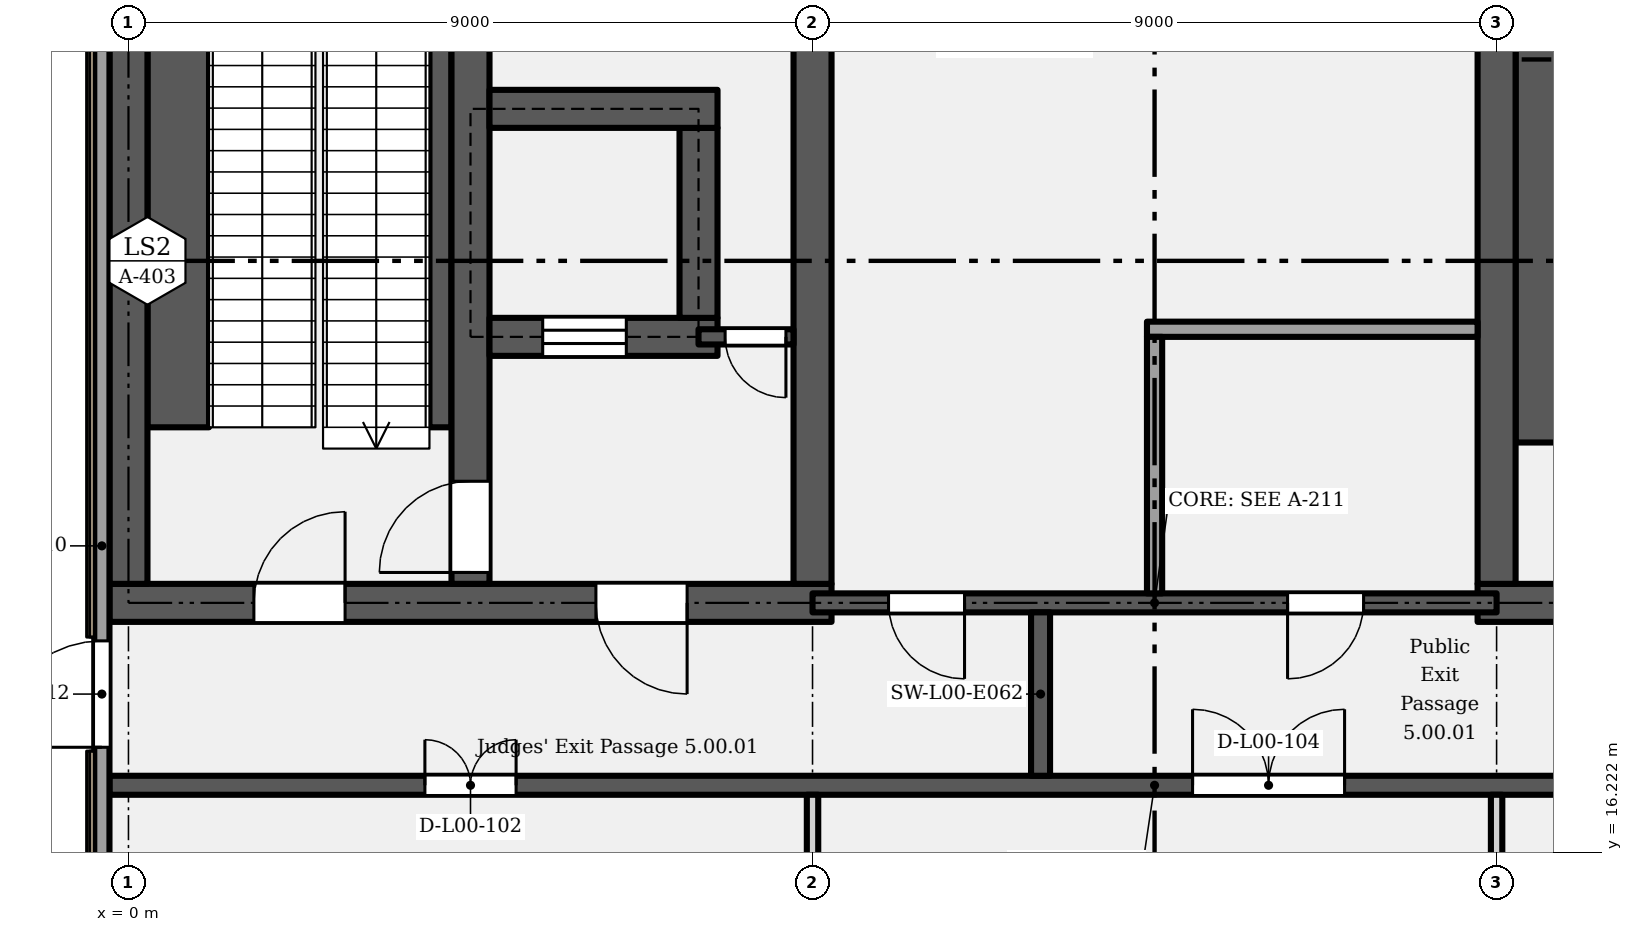
"""IFC4 building model, lengths in metres.
Left out: names, types, materials, properties, quantities, classifications, styles, units other than length and angle.
Written with IfcOpenShell. Run it as: python <this file> out.ifc"""

import sys

from ifc_helpers import new_model, si_unit, direction, frame, frame_2d, origin, place, context, subcontext, project, spatial, rectangle, extrude, element, fill, save


model = new_model("IFC4")
c1 = context("Model", 3, precision=1e-05, world=origin(), true_north=direction((0.0, 1.0)))
c2 = subcontext(c1, "Body", "Model", "MODEL_VIEW")
j1 = project(units=[si_unit("LENGTHUNIT", "METRE"), si_unit("PLANEANGLEUNIT", "RADIAN")], contexts=[c1])
p1 = place(None, origin())
s1 = spatial("IfcSite", under=j1, at=p1, CompositionType="ELEMENT")
p2 = place(p1, origin())
s2 = spatial("IfcBuilding", under=s1, at=p2, CompositionType="ELEMENT")
p3 = place(p2, origin())
s3 = spatial("IfcBuildingStorey", under=s2, at=p3, CompositionType="ELEMENT", Elevation=0.0)
p4 = place(p3, frame((-0.25, 19.5, 0.0), z_axis=(0.0, 0.0, 1.0), x_axis=(1.0, 0.0, 0.0)))
e1 = element("IfcWall", 1, at=p4, inside=s3, PredefinedType="SHEAR", context=c2, shape_type="SweptSolid", body=[
    extrude(rectangle(XDim=9.5, YDim=0.5, at=frame_2d((4.75, 0.0))), origin(), (0.0, 0.0, 1.0), 6.3),
])
p5 = place(p4, frame((1.9, 0.0, 0.0)))
e2 = element("IfcOpeningElement", 2, at=p5, cuts=e1, PredefinedType="OPENING", context=c2, shape_type="SweptSolid", body=[
    extrude(rectangle(XDim=1.2, YDim=2.1, at=frame_2d((0.6, 1.05))), frame((0.0, 0.26, 0.0), z_axis=(0.0, -1.0, 0.0), x_axis=(1.0, 0.0, 0.0)), (0.0, 0.0, 1.0), 0.52),
])
p6 = place(p4, frame((7.6, 0.0, 0.0), z_axis=(0.0, 0.0, 1.0), x_axis=(-1.0, 0.0, 0.0)))
e3 = element("IfcOpeningElement", 3, at=p6, cuts=e1, PredefinedType="OPENING", context=c2, shape_type="SweptSolid", body=[
    extrude(rectangle(XDim=1.2, YDim=2.1, at=frame_2d((0.6, 1.05))), frame((0.0, 0.26, 0.0), z_axis=(0.0, -1.0, 0.0), x_axis=(1.0, 0.0, 0.0)), (0.0, 0.0, 1.0), 0.52),
])
p7 = place(p3, frame((17.75, 19.5, 0.0), z_axis=(0.0, 0.0, 1.0), x_axis=(1.0, 0.0, 0.0)))
e4 = element("IfcWall", 4, at=p7, inside=s3, PredefinedType="SHEAR", context=c2, shape_type="SweptSolid", body=[
    extrude(rectangle(XDim=9.5, YDim=0.5, at=frame_2d((4.75, 0.0))), origin(), (0.0, 0.0, 1.0), 6.3),
])
p8 = place(p7, frame((1.9, 0.0, 0.0)))
e5 = element("IfcOpeningElement", 5, at=p8, cuts=e4, PredefinedType="OPENING", context=c2, shape_type="SweptSolid", body=[
    extrude(rectangle(XDim=1.2, YDim=2.1, at=frame_2d((0.6, 1.05))), frame((0.0, 0.26, 0.0), z_axis=(0.0, -1.0, 0.0), x_axis=(1.0, 0.0, 0.0)), (0.0, 0.0, 1.0), 0.52),
])
p9 = place(p7, frame((7.95, 0.0, 0.0), z_axis=(0.0, 0.0, 1.0), x_axis=(-1.0, 0.0, 0.0)))
e6 = element("IfcOpeningElement", 6, at=p9, cuts=e4, PredefinedType="OPENING", context=c2, shape_type="SweptSolid", body=[
    extrude(rectangle(XDim=1.8, YDim=2.1, at=frame_2d((0.9, 1.05))), frame((0.0, 0.26, 0.0), z_axis=(0.0, -1.0, 0.0), x_axis=(1.0, 0.0, 0.0)), (0.0, 0.0, 1.0), 0.52),
])
p10 = place(p3, frame((0.0, 19.75, 0.0), z_axis=(0.0, 0.0, 1.0), x_axis=(0.0, 1.0, 0.0)))
e7 = element("IfcWall", 7, at=p10, inside=s3, PredefinedType="SHEAR", context=c2, shape_type="SweptSolid", body=[
    extrude(rectangle(XDim=8.3, YDim=0.5, at=frame_2d((4.15, 0.0))), origin(), (0.0, 0.0, 1.0), 6.3),
])
p11 = place(p3, frame((4.5, 19.75, 0.0), z_axis=(0.0, 0.0, 1.0), x_axis=(0.0, 1.0, 0.0)))
e8 = element("IfcWall", 8, at=p11, inside=s3, PredefinedType="SHEAR", context=c2, shape_type="SweptSolid", body=[
    extrude(rectangle(XDim=8.5, YDim=0.5, at=frame_2d((4.25, 0.0))), origin(), (0.0, 0.0, 1.0), 6.3),
])
p12 = place(p11, frame((0.15, 0.0, 0.0)))
e9 = element("IfcOpeningElement", 9, at=p12, cuts=e8, PredefinedType="OPENING", context=c2, shape_type="SweptSolid", body=[
    extrude(rectangle(XDim=1.2, YDim=2.1, at=frame_2d((0.6, 1.05))), frame((0.0, 0.26, 0.0), z_axis=(0.0, -1.0, 0.0), x_axis=(1.0, 0.0, 0.0)), (0.0, 0.0, 1.0), 0.52),
])
for number, where, z_axis, x_axis in (
    (10, (9.0, 19.75, 0.0), (0.0, 0.0, 1.0), (0.0, 1.0, 0.0)),
    (11, (18.0, 19.75, 0.0), (0.0, 0.0, 1.0), (0.0, 1.0, 0.0)),
):
    element("IfcWall", number, at=place(p3, frame(where, z_axis=z_axis, x_axis=x_axis)), inside=s3, PredefinedType="SHEAR", context=c2, shape_type="SweptSolid", body=[
        extrude(rectangle(XDim=8.05, YDim=0.5, at=frame_2d((4.025, 0.0))), origin(), (0.0, 0.0, 1.0), 6.3),
    ])
p13 = place(p3, frame((4.75, 23.0, 0.0), z_axis=(0.0, 0.0, 1.0), x_axis=(1.0, 0.0, 0.0)))
e12 = element("IfcWall", 12, at=p13, inside=s3, PredefinedType="SHEAR", context=c2, shape_type="SweptSolid", body=[
    extrude(rectangle(XDim=3.0, YDim=0.5, at=frame_2d((1.5, 0.0))), origin(), (0.0, 0.0, 1.0), 6.3),
])
p14 = place(p13, frame((0.7, 0.0, 0.0)))
e13 = element("IfcOpeningElement", 13, at=p14, cuts=e12, PredefinedType="OPENING", context=c2, shape_type="SweptSolid", body=[
    extrude(rectangle(XDim=1.1, YDim=2.1, at=frame_2d((0.55, 1.05))), frame((0.0, 0.26, 0.0), z_axis=(0.0, -1.0, 0.0), x_axis=(1.0, 0.0, 0.0)), (0.0, 0.0, 1.0), 0.52),
])
p15 = place(p3, frame((7.5, 23.25, 0.0), z_axis=(0.0, 0.0, 1.0), x_axis=(0.0, 1.0, 0.0)))
e14 = element("IfcWall", 14, at=p15, inside=s3, PredefinedType="SHEAR", context=c2, shape_type="SweptSolid", body=[
    extrude(rectangle(XDim=2.5, YDim=0.5, at=frame_2d((1.25, 0.0))), origin(), (0.0, 0.0, 1.0), 6.3),
])
p16 = place(p3, frame((4.75, 26.0, 0.0), z_axis=(0.0, 0.0, 1.0), x_axis=(1.0, 0.0, 0.0)))
e15 = element("IfcWall", 15, at=p16, inside=s3, PredefinedType="SHEAR", context=c2, shape_type="SweptSolid", body=[
    extrude(rectangle(XDim=3.0, YDim=0.5, at=frame_2d((1.5, 0.0))), origin(), (0.0, 0.0, 1.0), 6.3),
])
p17 = place(p3, frame((-0.35, 12.45, 0.0), z_axis=(0.0, 0.0, 1.0), x_axis=(0.0, 1.0, 0.0)))
e16 = element("IfcWall", 16, at=p17, inside=s3, PredefinedType="SOLIDWALL", context=c2, shape_type="SweptSolid", body=[
    extrude(rectangle(XDim=15.6, YDim=0.2, at=frame_2d((7.8, 0.0))), origin(), (0.0, 0.0, 1.0), 6.3),
])
p18 = place(p17, frame((1.2, 0.0, 0.0)))
e17 = element("IfcOpeningElement", 17, at=p18, cuts=e16, PredefinedType="OPENING", context=c2, shape_type="SweptSolid", body=[
    extrude(rectangle(XDim=1.8, YDim=2.1, at=frame_2d((0.9, 1.05))), frame((0.0, 0.11, 0.0), z_axis=(0.0, -1.0, 0.0), x_axis=(1.0, 0.0, 0.0)), (0.0, 0.0, 1.0), 0.22),
])
p19 = place(p17, frame((5.15, 0.0, 0.0)))
e18 = element("IfcOpeningElement", 18, at=p19, cuts=e16, PredefinedType="OPENING", context=c2, shape_type="SweptSolid", body=[
    extrude(rectangle(XDim=1.4, YDim=2.1, at=frame_2d((0.7, 1.05))), frame((0.0, 0.11, 0.0), z_axis=(0.0, -1.0, 0.0), x_axis=(1.0, 0.0, 0.0)), (0.0, 0.0, 1.0), 0.22),
])
p20 = place(p3, frame((-0.25, 17.1, 0.0), z_axis=(0.0, 0.0, 1.0), x_axis=(1.0, 0.0, 0.0)))
e19 = element("IfcWall", 19, at=p20, inside=s3, PredefinedType="SHEAR", context=c2, shape_type="SweptSolid", body=[
    extrude(rectangle(XDim=27.5, YDim=0.25, at=frame_2d((13.75, 0.0))), origin(), (0.0, 0.0, 1.0), 6.3),
])
p21 = place(p20, frame((4.15, 0.0, 0.0)))
e20 = element("IfcOpeningElement", 20, at=p21, cuts=e19, PredefinedType="OPENING", context=c2, shape_type="SweptSolid", body=[
    extrude(rectangle(XDim=1.2, YDim=2.1, at=frame_2d((0.6, 1.05))), frame((0.0, 0.135, 0.0), z_axis=(0.0, -1.0, 0.0), x_axis=(1.0, 0.0, 0.0)), (0.0, 0.0, 1.0), 0.27),
])
p22 = place(p20, frame((14.25, 0.0, 0.0)))
e21 = element("IfcOpeningElement", 21, at=p22, cuts=e19, PredefinedType="OPENING", context=c2, shape_type="SweptSolid", body=[
    extrude(rectangle(XDim=2.0, YDim=2.1, at=frame_2d((1.0, 1.05))), frame((0.0, 0.135, 0.0), z_axis=(0.0, -1.0, 0.0), x_axis=(1.0, 0.0, 0.0)), (0.0, 0.0, 1.0), 0.27),
])
p23 = place(p20, frame((20.0, 0.0, 0.0)))
e22 = element("IfcOpeningElement", 22, at=p23, cuts=e19, PredefinedType="OPENING", context=c2, shape_type="SweptSolid", body=[
    extrude(rectangle(XDim=1.0, YDim=2.1, at=frame_2d((0.5, 1.05))), frame((0.0, 0.135, 0.0), z_axis=(0.0, -1.0, 0.0), x_axis=(1.0, 0.0, 0.0)), (0.0, 0.0, 1.0), 0.27),
])
p24 = place(p20, frame((23.45, 0.0, 0.0)))
e23 = element("IfcOpeningElement", 23, at=p24, cuts=e19, PredefinedType="OPENING", context=c2, shape_type="SweptSolid", body=[
    extrude(rectangle(XDim=0.9, YDim=2.1, at=frame_2d((0.45, 1.05))), frame((0.0, 0.135, 0.0), z_axis=(0.0, -1.0, 0.0), x_axis=(1.0, 0.0, 0.0)), (0.0, 0.0, 1.0), 0.27),
])
p25 = place(p20, frame((25.45, 0.0, 0.0)))
e24 = element("IfcOpeningElement", 24, at=p25, cuts=e19, PredefinedType="OPENING", context=c2, shape_type="SweptSolid", body=[
    extrude(rectangle(XDim=0.9, YDim=2.1, at=frame_2d((0.45, 1.05))), frame((0.0, 0.135, 0.0), z_axis=(0.0, -1.0, 0.0), x_axis=(1.0, 0.0, 0.0)), (0.0, 0.0, 1.0), 0.27),
])
p26 = place(p3, frame((9.0, 19.5, 0.0), z_axis=(0.0, 0.0, 1.0), x_axis=(1.0, 0.0, 0.0)))
e25 = element("IfcWall", 25, at=p26, inside=s3, PredefinedType="SHEAR", context=c2, shape_type="SweptSolid", body=[
    extrude(rectangle(XDim=9.0, YDim=0.25, at=frame_2d((4.5, 0.0))), origin(), (0.0, 0.0, 1.0), 6.3),
])
p27 = place(p26, frame((2.0, 0.0, 0.0), z_axis=(0.0, 0.0, 1.0), x_axis=(-1.0, 0.0, 0.0)))
e26 = element("IfcOpeningElement", 26, at=p27, cuts=e25, PredefinedType="OPENING", context=c2, shape_type="SweptSolid", body=[
    extrude(rectangle(XDim=1.0, YDim=2.1, at=frame_2d((0.5, 1.05))), frame((0.0, 0.135, 0.0), z_axis=(0.0, -1.0, 0.0), x_axis=(1.0, 0.0, 0.0)), (0.0, 0.0, 1.0), 0.27),
])
p28 = place(p26, frame((7.25, 0.0, 0.0), z_axis=(0.0, 0.0, 1.0), x_axis=(-1.0, 0.0, 0.0)))
e27 = element("IfcOpeningElement", 27, at=p28, cuts=e25, PredefinedType="OPENING", context=c2, shape_type="SweptSolid", body=[
    extrude(rectangle(XDim=1.0, YDim=2.1, at=frame_2d((0.5, 1.05))), frame((0.0, 0.135, 0.0), z_axis=(0.0, -1.0, 0.0), x_axis=(1.0, 0.0, 0.0)), (0.0, 0.0, 1.0), 0.27),
])
p29 = place(p3, frame((7.5, 23.0, 0.0), z_axis=(0.0, 0.0, 1.0), x_axis=(1.0, 0.0, 0.0)))
e28 = element("IfcWall", 28, at=p29, inside=s3, PredefinedType="SHEAR", context=c2, shape_type="SweptSolid", body=[
    extrude(rectangle(XDim=1.25, YDim=0.2, at=frame_2d((0.625, 0.0))), origin(), (0.0, 0.0, 1.0), 6.3),
])
p30 = place(p29, frame((1.15, 0.0, 0.0), z_axis=(0.0, 0.0, 1.0), x_axis=(-1.0, 0.0, 0.0)))
e29 = element("IfcOpeningElement", 29, at=p30, cuts=e28, PredefinedType="OPENING", context=c2, shape_type="SweptSolid", body=[
    extrude(rectangle(XDim=0.8, YDim=2.0, at=frame_2d((0.4, 1.0))), frame((0.0, 0.11, 0.0), z_axis=(0.0, -1.0, 0.0), x_axis=(1.0, 0.0, 0.0)), (0.0, 0.0, 1.0), 0.22),
])
p31 = place(p3, frame((13.4, 23.1, 0.0), z_axis=(0.0, 0.0, 1.0), x_axis=(1.0, 0.0, 0.0)))
e30 = element("IfcWall", 30, at=p31, inside=s3, PredefinedType="PARTITIONING", context=c2, shape_type="SweptSolid", body=[
    extrude(rectangle(XDim=4.35, YDim=0.2, at=frame_2d((2.175, 0.0))), origin(), (0.0, 0.0, 1.0), 6.3),
])
p32 = place(p3, frame((9.0, 12.7, 0.0), z_axis=(0.0, 0.0, 1.0), x_axis=(0.0, 1.0, 0.0)))
e31 = element("IfcWall", 31, at=p32, inside=s3, PredefinedType="PARTITIONING", context=c2, shape_type="SweptSolid", body=[
    extrude(rectangle(XDim=4.275, YDim=0.15, at=frame_2d((2.138, 0.0))), origin(), (0.0, 0.0, 1.0), 5.35),
])
p33 = place(p3, frame((12.0, 17.225, 0.0), z_axis=(0.0, 0.0, 1.0), x_axis=(0.0, 1.0, 0.0)))
e32 = element("IfcWall", 32, at=p33, inside=s3, PredefinedType="SHEAR", context=c2, shape_type="SweptSolid", body=[
    extrude(rectangle(XDim=2.15, YDim=0.25, at=frame_2d((1.075, 0.0))), origin(), (0.0, 0.0, 1.0), 6.3),
])
p34 = place(p3, frame((13.5, 19.625, 0.0), z_axis=(0.0, 0.0, 1.0), x_axis=(0.0, 1.0, 0.0)))
e33 = element("IfcWall", 33, at=p34, inside=s3, PredefinedType="PARTITIONING", context=c2, shape_type="SweptSolid", body=[
    extrude(rectangle(XDim=3.375, YDim=0.2, at=frame_2d((1.688, 0.0))), origin(), (0.0, 0.0, 1.0), 6.3),
])
p35 = place(p3, frame((18.0, 12.7, 0.0), z_axis=(0.0, 0.0, 1.0), x_axis=(0.0, 1.0, 0.0)))
e34 = element("IfcWall", 34, at=p35, inside=s3, PredefinedType="PARTITIONING", context=c2, shape_type="SweptSolid", body=[
    extrude(rectangle(XDim=4.275, YDim=0.15, at=frame_2d((2.138, 0.0))), origin(), (0.0, 0.0, 1.0), 5.35),
])
p36 = place(p3, frame((18.6, 21.61, 0.0), z_axis=(0.0, 0.0, 1.0), x_axis=(0.0, 1.0, 0.0)))
e35 = element("IfcWall", 35, at=p36, inside=s3, PredefinedType="SHEAR", context=c2, shape_type="SweptSolid", body=[
    extrude(rectangle(XDim=6.14, YDim=0.7, at=frame_2d((3.07, 0.0))), origin(), (0.0, 0.0, 1.0), 3.1),
])
p37 = place(p3, frame((0.655, 21.81, 0.0), z_axis=(0.0, 0.0, 1.0), x_axis=(0.0, 1.0, 0.0)))
e36 = element("IfcWall", 36, at=p37, inside=s3, PredefinedType="SHEAR", context=c2, shape_type="SweptSolid", body=[
    extrude(rectangle(XDim=6.19, YDim=0.81, at=frame_2d((3.095, 0.0))), origin(), (0.0, 0.0, 1.0), 3.1),
])
p38 = place(p3, frame((4.105, 21.81, 0.0), z_axis=(0.0, 0.0, 1.0), x_axis=(0.0, 1.0, 0.0)))
e37 = element("IfcWall", 37, at=p38, inside=s3, PredefinedType="SHEAR", context=c2, shape_type="SweptSolid", body=[
    extrude(rectangle(XDim=6.44, YDim=0.29, at=frame_2d((3.22, 0.0))), origin(), (0.0, 0.0, 1.0), 3.1),
])
p39 = place(p19, origin())
e38 = element("IfcDoor", 38, at=p39, inside=s3, OperationType="SINGLE_SWING_RIGHT", PredefinedType="DOOR", context=c2, shape_type="SweptSolid", body=[
    extrude(rectangle(XDim=1.4, YDim=2.1, at=frame_2d((0.7, 1.05))), frame((0.0, 0.025, 0.0), z_axis=(0.0, -1.0, 0.0), x_axis=(1.0, 0.0, 0.0)), (0.0, 0.0, 1.0), 0.05),
])
fill(e18, e38)
p40 = place(p5, origin())
e39 = element("IfcDoor", 39, at=p40, inside=s3, OperationType="SINGLE_SWING_RIGHT", PredefinedType="DOOR", context=c2, shape_type="SweptSolid", body=[
    extrude(rectangle(XDim=1.2, YDim=2.1, at=frame_2d((0.6, 1.05))), frame((0.0, 0.025, 0.0), z_axis=(0.0, -1.0, 0.0), x_axis=(1.0, 0.0, 0.0)), (0.0, 0.0, 1.0), 0.05),
])
fill(e2, e39)
p41 = place(p12, origin())
e40 = element("IfcDoor", 40, at=p41, inside=s3, OperationType="SINGLE_SWING_LEFT", PredefinedType="DOOR", context=c2, shape_type="SweptSolid", body=[
    extrude(rectangle(XDim=1.2, YDim=2.1, at=frame_2d((0.6, 1.05))), frame((0.0, 0.025, 0.0), z_axis=(0.0, -1.0, 0.0), x_axis=(1.0, 0.0, 0.0)), (0.0, 0.0, 1.0), 0.05),
])
fill(e9, e40)
p42 = place(p6, origin())
e41 = element("IfcDoor", 41, at=p42, inside=s3, OperationType="SINGLE_SWING_LEFT", PredefinedType="DOOR", context=c2, shape_type="SweptSolid", body=[
    extrude(rectangle(XDim=1.2, YDim=2.1, at=frame_2d((0.6, 1.05))), frame((0.0, 0.025, 0.0), z_axis=(0.0, -1.0, 0.0), x_axis=(1.0, 0.0, 0.0)), (0.0, 0.0, 1.0), 0.05),
])
fill(e3, e41)
p43 = place(p14, origin())
e42 = element("IfcDoor", 42, at=p43, inside=s3, OperationType="SLIDING_TO_LEFT", PredefinedType="DOOR", context=c2, shape_type="SweptSolid", body=[
    extrude(rectangle(XDim=1.1, YDim=2.1, at=frame_2d((0.55, 1.05))), frame((0.0, 0.025, 0.0), z_axis=(0.0, -1.0, 0.0), x_axis=(1.0, 0.0, 0.0)), (0.0, 0.0, 1.0), 0.05),
])
fill(e13, e42)
p44 = place(p30, origin())
e43 = element("IfcDoor", 43, at=p44, inside=s3, OperationType="SINGLE_SWING_LEFT", PredefinedType="DOOR", context=c2, shape_type="SweptSolid", body=[
    extrude(rectangle(XDim=0.8, YDim=2.0, at=frame_2d((0.4, 1.0))), frame((0.0, 0.025, 0.0), z_axis=(0.0, -1.0, 0.0), x_axis=(1.0, 0.0, 0.0)), (0.0, 0.0, 1.0), 0.05),
])
fill(e29, e43)
p45 = place(p21, origin())
e44 = element("IfcDoor", 44, at=p45, inside=s3, OperationType="DOUBLE_DOOR_SINGLE_SWING", PredefinedType="DOOR", context=c2, shape_type="SweptSolid", body=[
    extrude(rectangle(XDim=1.2, YDim=2.1, at=frame_2d((0.6, 1.05))), frame((0.0, 0.025, 0.0), z_axis=(0.0, -1.0, 0.0), x_axis=(1.0, 0.0, 0.0)), (0.0, 0.0, 1.0), 0.05),
])
fill(e20, e44)
p46 = place(p22, origin())
e45 = element("IfcDoor", 45, at=p46, inside=s3, OperationType="DOUBLE_DOOR_SINGLE_SWING", PredefinedType="DOOR", context=c2, shape_type="SweptSolid", body=[
    extrude(rectangle(XDim=2.0, YDim=2.1, at=frame_2d((1.0, 1.05))), frame((0.0, 0.025, 0.0), z_axis=(0.0, -1.0, 0.0), x_axis=(1.0, 0.0, 0.0)), (0.0, 0.0, 1.0), 0.05),
])
fill(e21, e45)
p47 = place(p27, origin())
e46 = element("IfcDoor", 46, at=p47, inside=s3, OperationType="SINGLE_SWING_LEFT", PredefinedType="DOOR", context=c2, shape_type="SweptSolid", body=[
    extrude(rectangle(XDim=1.0, YDim=2.1, at=frame_2d((0.5, 1.05))), frame((0.0, 0.025, 0.0), z_axis=(0.0, -1.0, 0.0), x_axis=(1.0, 0.0, 0.0)), (0.0, 0.0, 1.0), 0.05),
])
fill(e26, e46)
p48 = place(p28, origin())
e47 = element("IfcDoor", 47, at=p48, inside=s3, OperationType="SINGLE_SWING_RIGHT", PredefinedType="DOOR", context=c2, shape_type="SweptSolid", body=[
    extrude(rectangle(XDim=1.0, YDim=2.1, at=frame_2d((0.5, 1.05))), frame((0.0, 0.025, 0.0), z_axis=(0.0, -1.0, 0.0), x_axis=(1.0, 0.0, 0.0)), (0.0, 0.0, 1.0), 0.05),
])
fill(e27, e47)
save(model, sys.argv[1])
